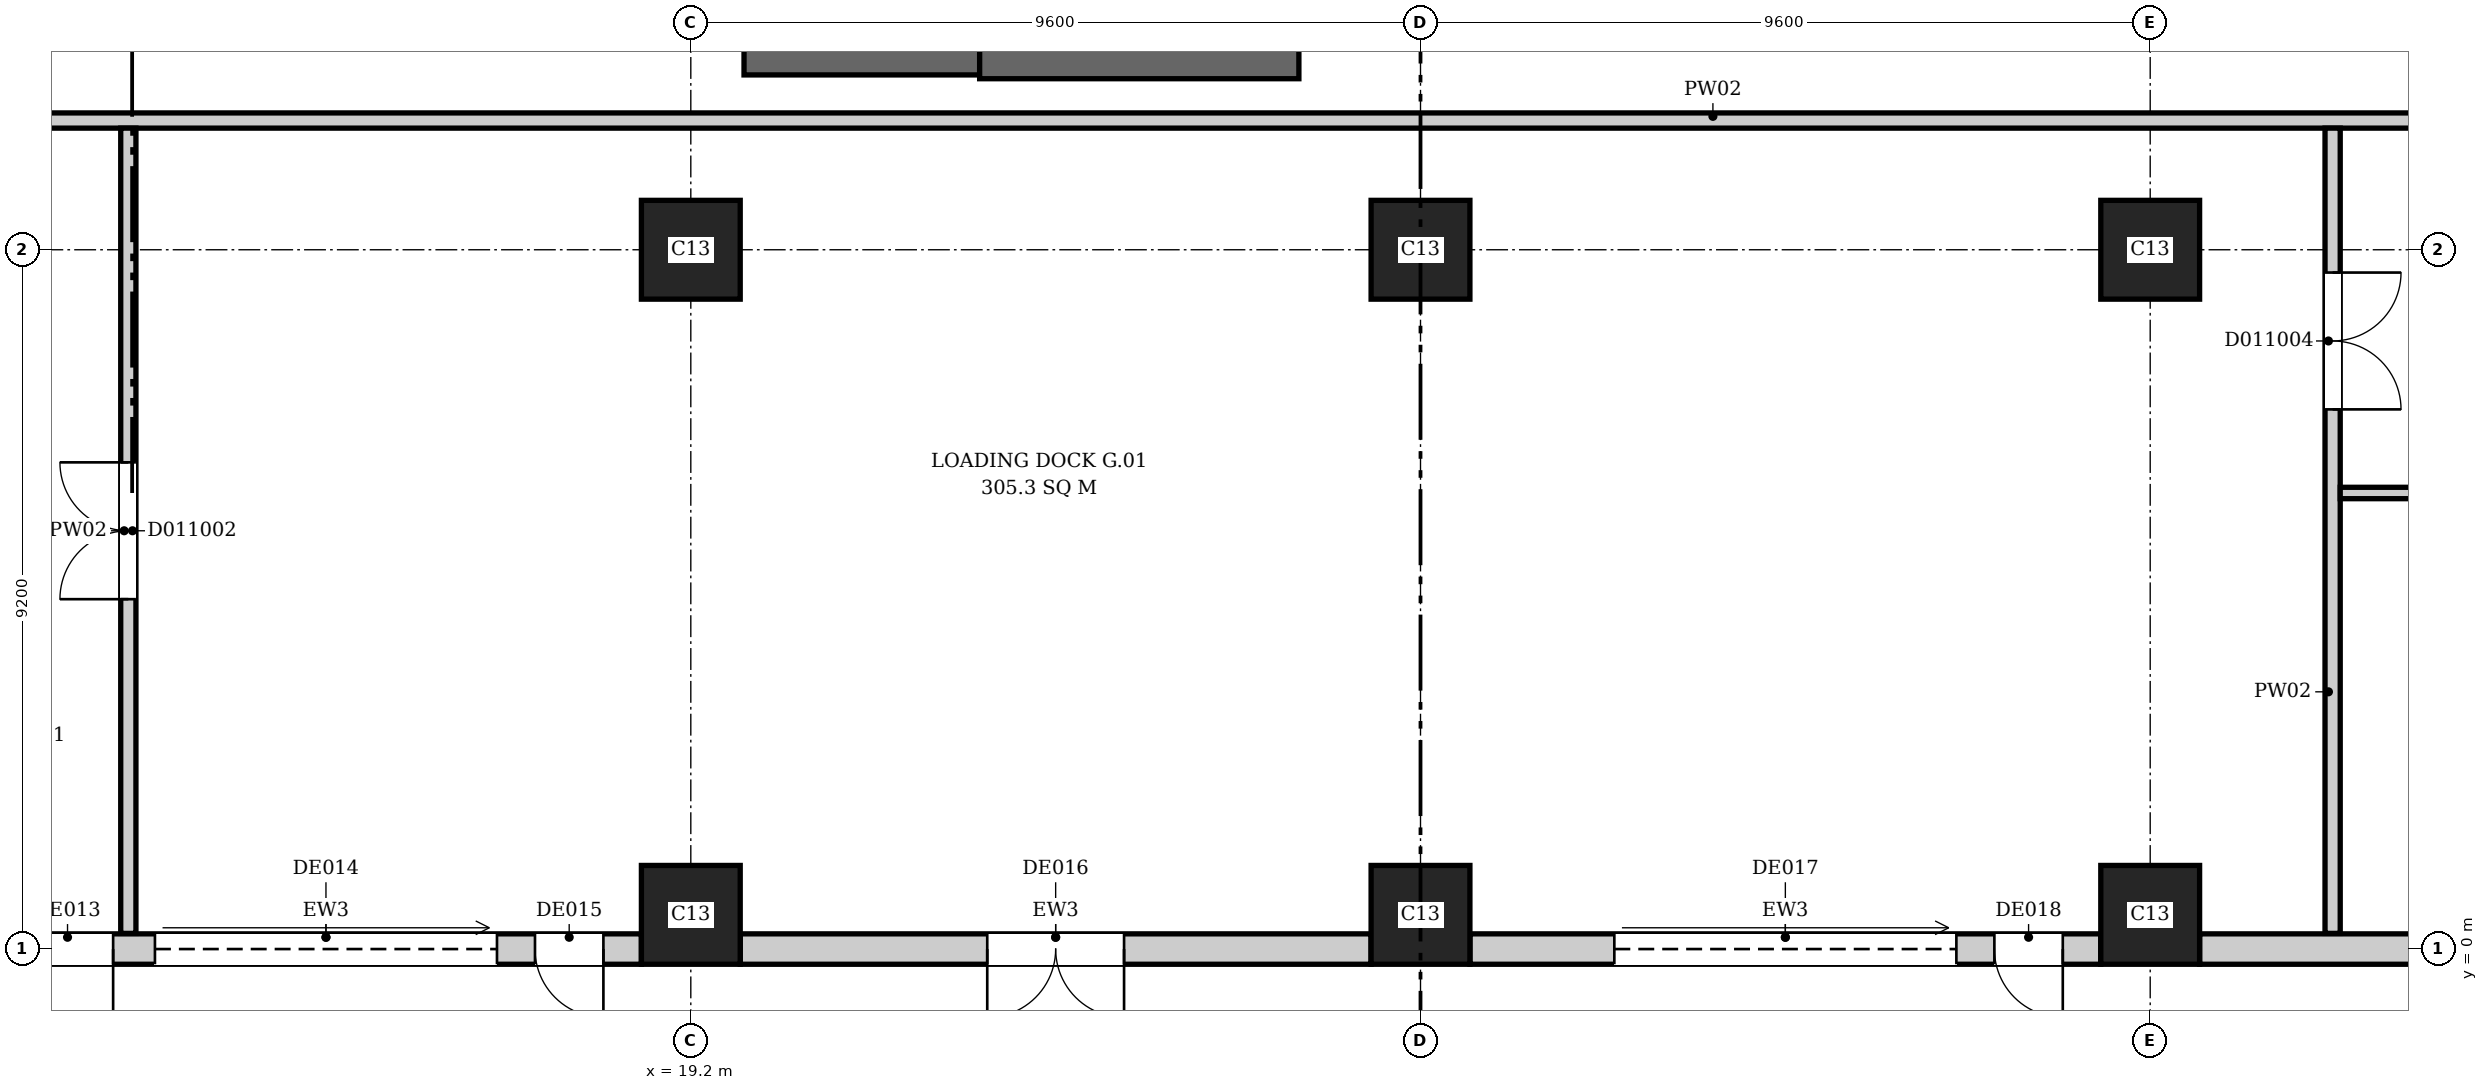
"""IFC4 building model, lengths in metres.
Left out: names, types, materials, properties, quantities, classifications, styles, units other than length and angle.
Written with IfcOpenShell. Run it as: python <this file> out.ifc"""

import sys

from ifc_helpers import new_model, si_unit, direction, frame, frame_2d, origin, origin_2d, place, context, subcontext, project, spatial, rectangle, extrude, element, fill, save


model = new_model("IFC4")
c1 = context("Model", 3, precision=1e-05, world=origin(), true_north=direction((0.0, 1.0)))
c2 = subcontext(c1, "Body", "Model", "MODEL_VIEW")
j1 = project(units=[si_unit("LENGTHUNIT", "METRE"), si_unit("PLANEANGLEUNIT", "RADIAN")], contexts=[c1])
p1 = place(None, origin())
s1 = spatial("IfcSite", under=j1, at=p1, CompositionType="ELEMENT")
p2 = place(p1, origin())
s2 = spatial("IfcBuilding", under=s1, at=p2, CompositionType="ELEMENT")
p3 = place(p2, origin())
s3 = spatial("IfcBuildingStorey", under=s2, at=p3, CompositionType="ELEMENT", Elevation=0.0)
p4 = place(p3, frame((23.0, 11.65, 0.0), z_axis=(0.0, 0.0, 1.0), x_axis=(1.0, 0.0, 0.0)))
e1 = element("IfcWall", 1, at=p4, inside=s3, PredefinedType="SHEAR", context=c2, shape_type="SweptSolid", body=[
    extrude(rectangle(XDim=4.2, YDim=0.4, at=frame_2d((2.1, 0.0))), origin(), (0.0, 0.0, 1.0), 6.5),
])
p5 = place(p3, frame((19.9, 11.7, 0.0), z_axis=(0.0, 0.0, 1.0), x_axis=(1.0, 0.0, 0.0)))
e2 = element("IfcWall", 2, at=p5, inside=s3, PredefinedType="SHEAR", context=c2, shape_type="SweptSolid", body=[
    extrude(rectangle(XDim=3.1, YDim=0.4, at=frame_2d((1.55, 0.0))), origin(), (0.0, 0.0, 1.0), 6.5),
])
for number, where, z_axis, x_axis in (
    (3, (19.2, 0.45, 0.0), (0.0, 0.0, 1.0), (1.0, 0.0, 0.0)),
    (4, (28.8, 0.45, 0.0), (0.0, 0.0, 1.0), (1.0, 0.0, 0.0)),
    (5, (38.4, 0.45, 0.0), (0.0, 0.0, 1.0), (1.0, 0.0, 0.0)),
    (6, (19.2, 9.2, 0.0), (0.0, 0.0, 1.0), (1.0, 0.0, 0.0)),
    (7, (28.8, 9.2, 0.0), (0.0, 0.0, 1.0), (1.0, 0.0, 0.0)),
    (8, (38.4, 9.2, 0.0), (0.0, 0.0, 1.0), (1.0, 0.0, 0.0)),
):
    element("IfcColumn", number, at=place(p3, frame(where, z_axis=z_axis, x_axis=x_axis)), inside=s3, PredefinedType="COLUMN", context=c2, shape_type="SweptSolid", body=[
        extrude(rectangle(XDim=1.3, YDim=1.3, at=origin_2d()), origin(), (0.0, 0.0, 1.0), 6.5),
    ])
p6 = place(p3, frame((10.25, 0.0, 0.0), z_axis=(0.0, 0.0, 1.0), x_axis=(1.0, 0.0, 0.0)))
e9 = element("IfcWall", 9, at=p6, inside=s3, PredefinedType="ELEMENTEDWALL", context=c2, shape_type="SweptSolid", body=[
    extrude(rectangle(XDim=8.3, YDim=0.4, at=frame_2d((4.15, 0.0))), origin(), (0.0, 0.0, 1.0), 6.15),
])
p7 = place(p6, frame((0.15, 0.0, 0.0)))
e10 = element("IfcOpeningElement", 10, at=p7, cuts=e9, PredefinedType="OPENING", context=c2, shape_type="SweptSolid", body=[
    extrude(rectangle(XDim=1.2, YDim=2.4, at=frame_2d((0.6, 1.2))), frame((0.0, 0.21, 0.0), z_axis=(0.0, -1.0, 0.0), x_axis=(1.0, 0.0, 0.0)), (0.0, 0.0, 1.0), 0.42),
])
p8 = place(p6, frame((1.9, 0.0, 0.0)))
e11 = element("IfcOpeningElement", 11, at=p8, cuts=e9, PredefinedType="OPENING", context=c2, shape_type="SweptSolid", body=[
    extrude(rectangle(XDim=4.5, YDim=4.5, at=frame_2d((2.25, 2.25))), frame((0.0, 0.21, 0.0), z_axis=(0.0, -1.0, 0.0), x_axis=(1.0, 0.0, 0.0)), (0.0, 0.0, 1.0), 0.42),
])
p9 = place(p6, frame((6.9, 0.0, 0.0)))
e12 = element("IfcOpeningElement", 12, at=p9, cuts=e9, PredefinedType="OPENING", context=c2, shape_type="SweptSolid", body=[
    extrude(rectangle(XDim=0.9, YDim=2.1, at=frame_2d((0.45, 1.05))), frame((0.0, 0.21, 0.0), z_axis=(0.0, -1.0, 0.0), x_axis=(1.0, 0.0, 0.0)), (0.0, 0.0, 1.0), 0.42),
])
p10 = place(p3, frame((19.85, 0.0, 0.0), z_axis=(0.0, 0.0, 1.0), x_axis=(1.0, 0.0, 0.0)))
e13 = element("IfcWall", 13, at=p10, inside=s3, PredefinedType="ELEMENTEDWALL", context=c2, shape_type="SweptSolid", body=[
    extrude(rectangle(XDim=8.3, YDim=0.4, at=frame_2d((4.15, 0.0))), origin(), (0.0, 0.0, 1.0), 6.15),
])
p11 = place(p10, frame((3.25, 0.0, 0.0)))
e14 = element("IfcOpeningElement", 14, at=p11, cuts=e13, PredefinedType="OPENING", context=c2, shape_type="SweptSolid", body=[
    extrude(rectangle(XDim=1.8, YDim=2.4, at=frame_2d((0.9, 1.2))), frame((0.0, 0.21, 0.0), z_axis=(0.0, -1.0, 0.0), x_axis=(1.0, 0.0, 0.0)), (0.0, 0.0, 1.0), 0.42),
])
p12 = place(p3, frame((29.45, 0.0, 0.0), z_axis=(0.0, 0.0, 1.0), x_axis=(1.0, 0.0, 0.0)))
e15 = element("IfcWall", 15, at=p12, inside=s3, PredefinedType="ELEMENTEDWALL", context=c2, shape_type="SweptSolid", body=[
    extrude(rectangle(XDim=8.3, YDim=0.4, at=frame_2d((4.15, 0.0))), origin(), (0.0, 0.0, 1.0), 6.15),
])
p13 = place(p12, frame((1.9, 0.0, 0.0)))
e16 = element("IfcOpeningElement", 16, at=p13, cuts=e15, PredefinedType="OPENING", context=c2, shape_type="SweptSolid", body=[
    extrude(rectangle(XDim=4.5, YDim=4.5, at=frame_2d((2.25, 2.25))), frame((0.0, 0.21, 0.0), z_axis=(0.0, -1.0, 0.0), x_axis=(1.0, 0.0, 0.0)), (0.0, 0.0, 1.0), 0.42),
])
p14 = place(p12, frame((6.9, 0.0, 0.0)))
e17 = element("IfcOpeningElement", 17, at=p14, cuts=e15, PredefinedType="OPENING", context=c2, shape_type="SweptSolid", body=[
    extrude(rectangle(XDim=0.9, YDim=2.1, at=frame_2d((0.45, 1.05))), frame((0.0, 0.21, 0.0), z_axis=(0.0, -1.0, 0.0), x_axis=(1.0, 0.0, 0.0)), (0.0, 0.0, 1.0), 0.42),
])
p15 = place(p3, frame((39.05, 0.0, 0.0), z_axis=(0.0, 0.0, 1.0), x_axis=(1.0, 0.0, 0.0)))
e18 = element("IfcWall", 18, at=p15, inside=s3, PredefinedType="ELEMENTEDWALL", context=c2, shape_type="SweptSolid", body=[
    extrude(rectangle(XDim=8.3, YDim=0.4, at=frame_2d((4.15, 0.0))), origin(), (0.0, 0.0, 1.0), 6.15),
])
p16 = place(p15, frame((3.55, 0.0, 0.0)))
e19 = element("IfcOpeningElement", 19, at=p16, cuts=e18, PredefinedType="OPENING", context=c2, shape_type="SweptSolid", body=[
    extrude(rectangle(XDim=1.2, YDim=2.2, at=frame_2d((0.6, 1.1))), frame((0.0, 0.21, 0.0), z_axis=(0.0, -1.0, 0.0), x_axis=(1.0, 0.0, 0.0)), (0.0, 0.0, 1.0), 0.42),
])
p17 = place(p3, frame((7.9, 10.9, 0.0), z_axis=(0.0, 0.0, 1.0), x_axis=(1.0, 0.0, 0.0)))
e20 = element("IfcWall", 20, at=p17, inside=s3, PredefinedType="PARTITIONING", context=c2, shape_type="SweptSolid", body=[
    extrude(rectangle(XDim=49.494, YDim=0.2, at=frame_2d((24.747, 0.0))), origin(), (0.0, 0.0, 1.0), 6.15),
])
p18 = place(p17, frame((41.3, 0.0, 0.0)))
e21 = element("IfcOpeningElement", 21, at=p18, cuts=e20, PredefinedType="OPENING", context=c2, shape_type="SweptSolid", body=[
    extrude(rectangle(XDim=1.2, YDim=2.1, at=frame_2d((0.6, 1.05))), frame((0.0, 0.11, 0.0), z_axis=(0.0, -1.0, 0.0), x_axis=(1.0, 0.0, 0.0)), (0.0, 0.0, 1.0), 0.22),
])
p19 = place(p3, frame((11.8, 0.206, 0.0), z_axis=(0.0, 0.0, 1.0), x_axis=(0.0, 1.0, 0.0)))
e22 = element("IfcWall", 22, at=p19, inside=s3, PredefinedType="PARTITIONING", context=c2, shape_type="SweptSolid", body=[
    extrude(rectangle(XDim=10.594, YDim=0.2, at=frame_2d((5.297, 0.0))), origin(), (0.0, 0.0, 1.0), 6.15),
])
p20 = place(p19, frame((4.397, 0.0, 0.0)))
e23 = element("IfcOpeningElement", 23, at=p20, cuts=e22, PredefinedType="OPENING", context=c2, shape_type="SweptSolid", body=[
    extrude(rectangle(XDim=1.8, YDim=2.1, at=frame_2d((0.9, 1.05))), frame((0.0, 0.11, 0.0), z_axis=(0.0, -1.0, 0.0), x_axis=(1.0, 0.0, 0.0)), (0.0, 0.0, 1.0), 0.22),
])
p21 = place(p3, frame((40.8, 0.206, 0.0), z_axis=(0.0, 0.0, 1.0), x_axis=(0.0, 1.0, 0.0)))
e24 = element("IfcWall", 24, at=p21, inside=s3, PredefinedType="PARTITIONING", context=c2, shape_type="SweptSolid", body=[
    extrude(rectangle(XDim=10.594, YDim=0.2, at=frame_2d((5.297, 0.0))), origin(), (0.0, 0.0, 1.0), 6.15),
])
p22 = place(p21, frame((6.894, 0.0, 0.0)))
e25 = element("IfcOpeningElement", 25, at=p22, cuts=e24, PredefinedType="OPENING", context=c2, shape_type="SweptSolid", body=[
    extrude(rectangle(XDim=1.8, YDim=2.1, at=frame_2d((0.9, 1.05))), frame((0.0, 0.11, 0.0), z_axis=(0.0, -1.0, 0.0), x_axis=(1.0, 0.0, 0.0)), (0.0, 0.0, 1.0), 0.22),
])
p23 = place(p3, frame((40.9, 6.0, 0.0), z_axis=(0.0, 0.0, 1.0), x_axis=(1.0, 0.0, 0.0)))
e26 = element("IfcWall", 26, at=p23, inside=s3, PredefinedType="PARTITIONING", context=c2, shape_type="SweptSolid", body=[
    extrude(rectangle(XDim=5.175, YDim=0.15, at=frame_2d((2.587, 0.0))), origin(), (0.0, 0.0, 1.0), 6.15),
])
p24 = place(p23, frame((2.087, 0.0, 0.0)))
e27 = element("IfcOpeningElement", 27, at=p24, cuts=e26, PredefinedType="OPENING", context=c2, shape_type="SweptSolid", body=[
    extrude(rectangle(XDim=1.0, YDim=2.1, at=frame_2d((0.5, 1.05))), frame((0.0, 0.085, 0.0), z_axis=(0.0, -1.0, 0.0), x_axis=(1.0, 0.0, 0.0)), (0.0, 0.0, 1.0), 0.17),
])
p25 = place(p7, frame((1.2, 0.0, 0.0), z_axis=(0.0, 0.0, 1.0), x_axis=(-1.0, 0.0, 0.0)))
e28 = element("IfcDoor", 28, at=p25, inside=s3, OperationType="SINGLE_SWING_RIGHT", PredefinedType="DOOR", context=c2, shape_type="SweptSolid", body=[
    extrude(rectangle(XDim=1.2, YDim=2.4, at=frame_2d((0.6, 1.2))), frame((0.0, 0.025, 0.0), z_axis=(0.0, -1.0, 0.0), x_axis=(1.0, 0.0, 0.0)), (0.0, 0.0, 1.0), 0.05),
])
fill(e10, e28)
p26 = place(p8, frame((4.5, 0.0, 0.0), z_axis=(0.0, 0.0, 1.0), x_axis=(-1.0, 0.0, 0.0)))
e29 = element("IfcDoor", 29, at=p26, inside=s3, OperationType="ROLLINGUP", PredefinedType="GATE", context=c2, shape_type="SweptSolid", body=[
    extrude(rectangle(XDim=4.5, YDim=4.5, at=frame_2d((2.25, 2.25))), frame((0.0, 0.025, 0.0), z_axis=(0.0, -1.0, 0.0), x_axis=(1.0, 0.0, 0.0)), (0.0, 0.0, 1.0), 0.05),
])
fill(e11, e29)
p27 = place(p9, frame((0.9, 0.0, 0.0), z_axis=(0.0, 0.0, 1.0), x_axis=(-1.0, 0.0, 0.0)))
e30 = element("IfcDoor", 30, at=p27, inside=s3, OperationType="SINGLE_SWING_LEFT", PredefinedType="DOOR", context=c2, shape_type="SweptSolid", body=[
    extrude(rectangle(XDim=0.9, YDim=2.1, at=frame_2d((0.45, 1.05))), frame((0.0, 0.025, 0.0), z_axis=(0.0, -1.0, 0.0), x_axis=(1.0, 0.0, 0.0)), (0.0, 0.0, 1.0), 0.05),
])
fill(e12, e30)
p28 = place(p11, frame((1.8, 0.0, 0.0), z_axis=(0.0, 0.0, 1.0), x_axis=(-1.0, 0.0, 0.0)))
e31 = element("IfcDoor", 31, at=p28, inside=s3, OperationType="DOUBLE_DOOR_SINGLE_SWING", PredefinedType="DOOR", context=c2, shape_type="SweptSolid", body=[
    extrude(rectangle(XDim=1.8, YDim=2.4, at=frame_2d((0.9, 1.2))), frame((0.0, 0.025, 0.0), z_axis=(0.0, -1.0, 0.0), x_axis=(1.0, 0.0, 0.0)), (0.0, 0.0, 1.0), 0.05),
])
fill(e14, e31)
p29 = place(p13, frame((4.5, 0.0, 0.0), z_axis=(0.0, 0.0, 1.0), x_axis=(-1.0, 0.0, 0.0)))
e32 = element("IfcDoor", 32, at=p29, inside=s3, OperationType="ROLLINGUP", PredefinedType="GATE", context=c2, shape_type="SweptSolid", body=[
    extrude(rectangle(XDim=4.5, YDim=4.5, at=frame_2d((2.25, 2.25))), frame((0.0, 0.025, 0.0), z_axis=(0.0, -1.0, 0.0), x_axis=(1.0, 0.0, 0.0)), (0.0, 0.0, 1.0), 0.05),
])
fill(e16, e32)
p30 = place(p14, frame((0.9, 0.0, 0.0), z_axis=(0.0, 0.0, 1.0), x_axis=(-1.0, 0.0, 0.0)))
e33 = element("IfcDoor", 33, at=p30, inside=s3, OperationType="SINGLE_SWING_LEFT", PredefinedType="DOOR", context=c2, shape_type="SweptSolid", body=[
    extrude(rectangle(XDim=0.9, YDim=2.1, at=frame_2d((0.45, 1.05))), frame((0.0, 0.025, 0.0), z_axis=(0.0, -1.0, 0.0), x_axis=(1.0, 0.0, 0.0)), (0.0, 0.0, 1.0), 0.05),
])
fill(e17, e33)
p31 = place(p20, origin())
e34 = element("IfcDoor", 34, at=p31, inside=s3, OperationType="DOUBLE_DOOR_SINGLE_SWING", PredefinedType="DOOR", context=c2, shape_type="SweptSolid", body=[
    extrude(rectangle(XDim=1.8, YDim=2.1, at=frame_2d((0.9, 1.05))), frame((0.0, 0.025, 0.0), z_axis=(0.0, -1.0, 0.0), x_axis=(1.0, 0.0, 0.0)), (0.0, 0.0, 1.0), 0.05),
])
fill(e23, e34)
p32 = place(p22, origin())
e35 = element("IfcDoor", 35, at=p32, inside=s3, OperationType="DOUBLE_DOOR_SINGLE_SWING", PredefinedType="DOOR", context=c2, shape_type="SweptSolid", body=[
    extrude(rectangle(XDim=1.8, YDim=2.1, at=frame_2d((0.9, 1.05))), frame((0.0, 0.025, 0.0), z_axis=(0.0, -1.0, 0.0), x_axis=(1.0, 0.0, 0.0)), (0.0, 0.0, 1.0), 0.05),
])
fill(e25, e35)
save(model, sys.argv[1])
